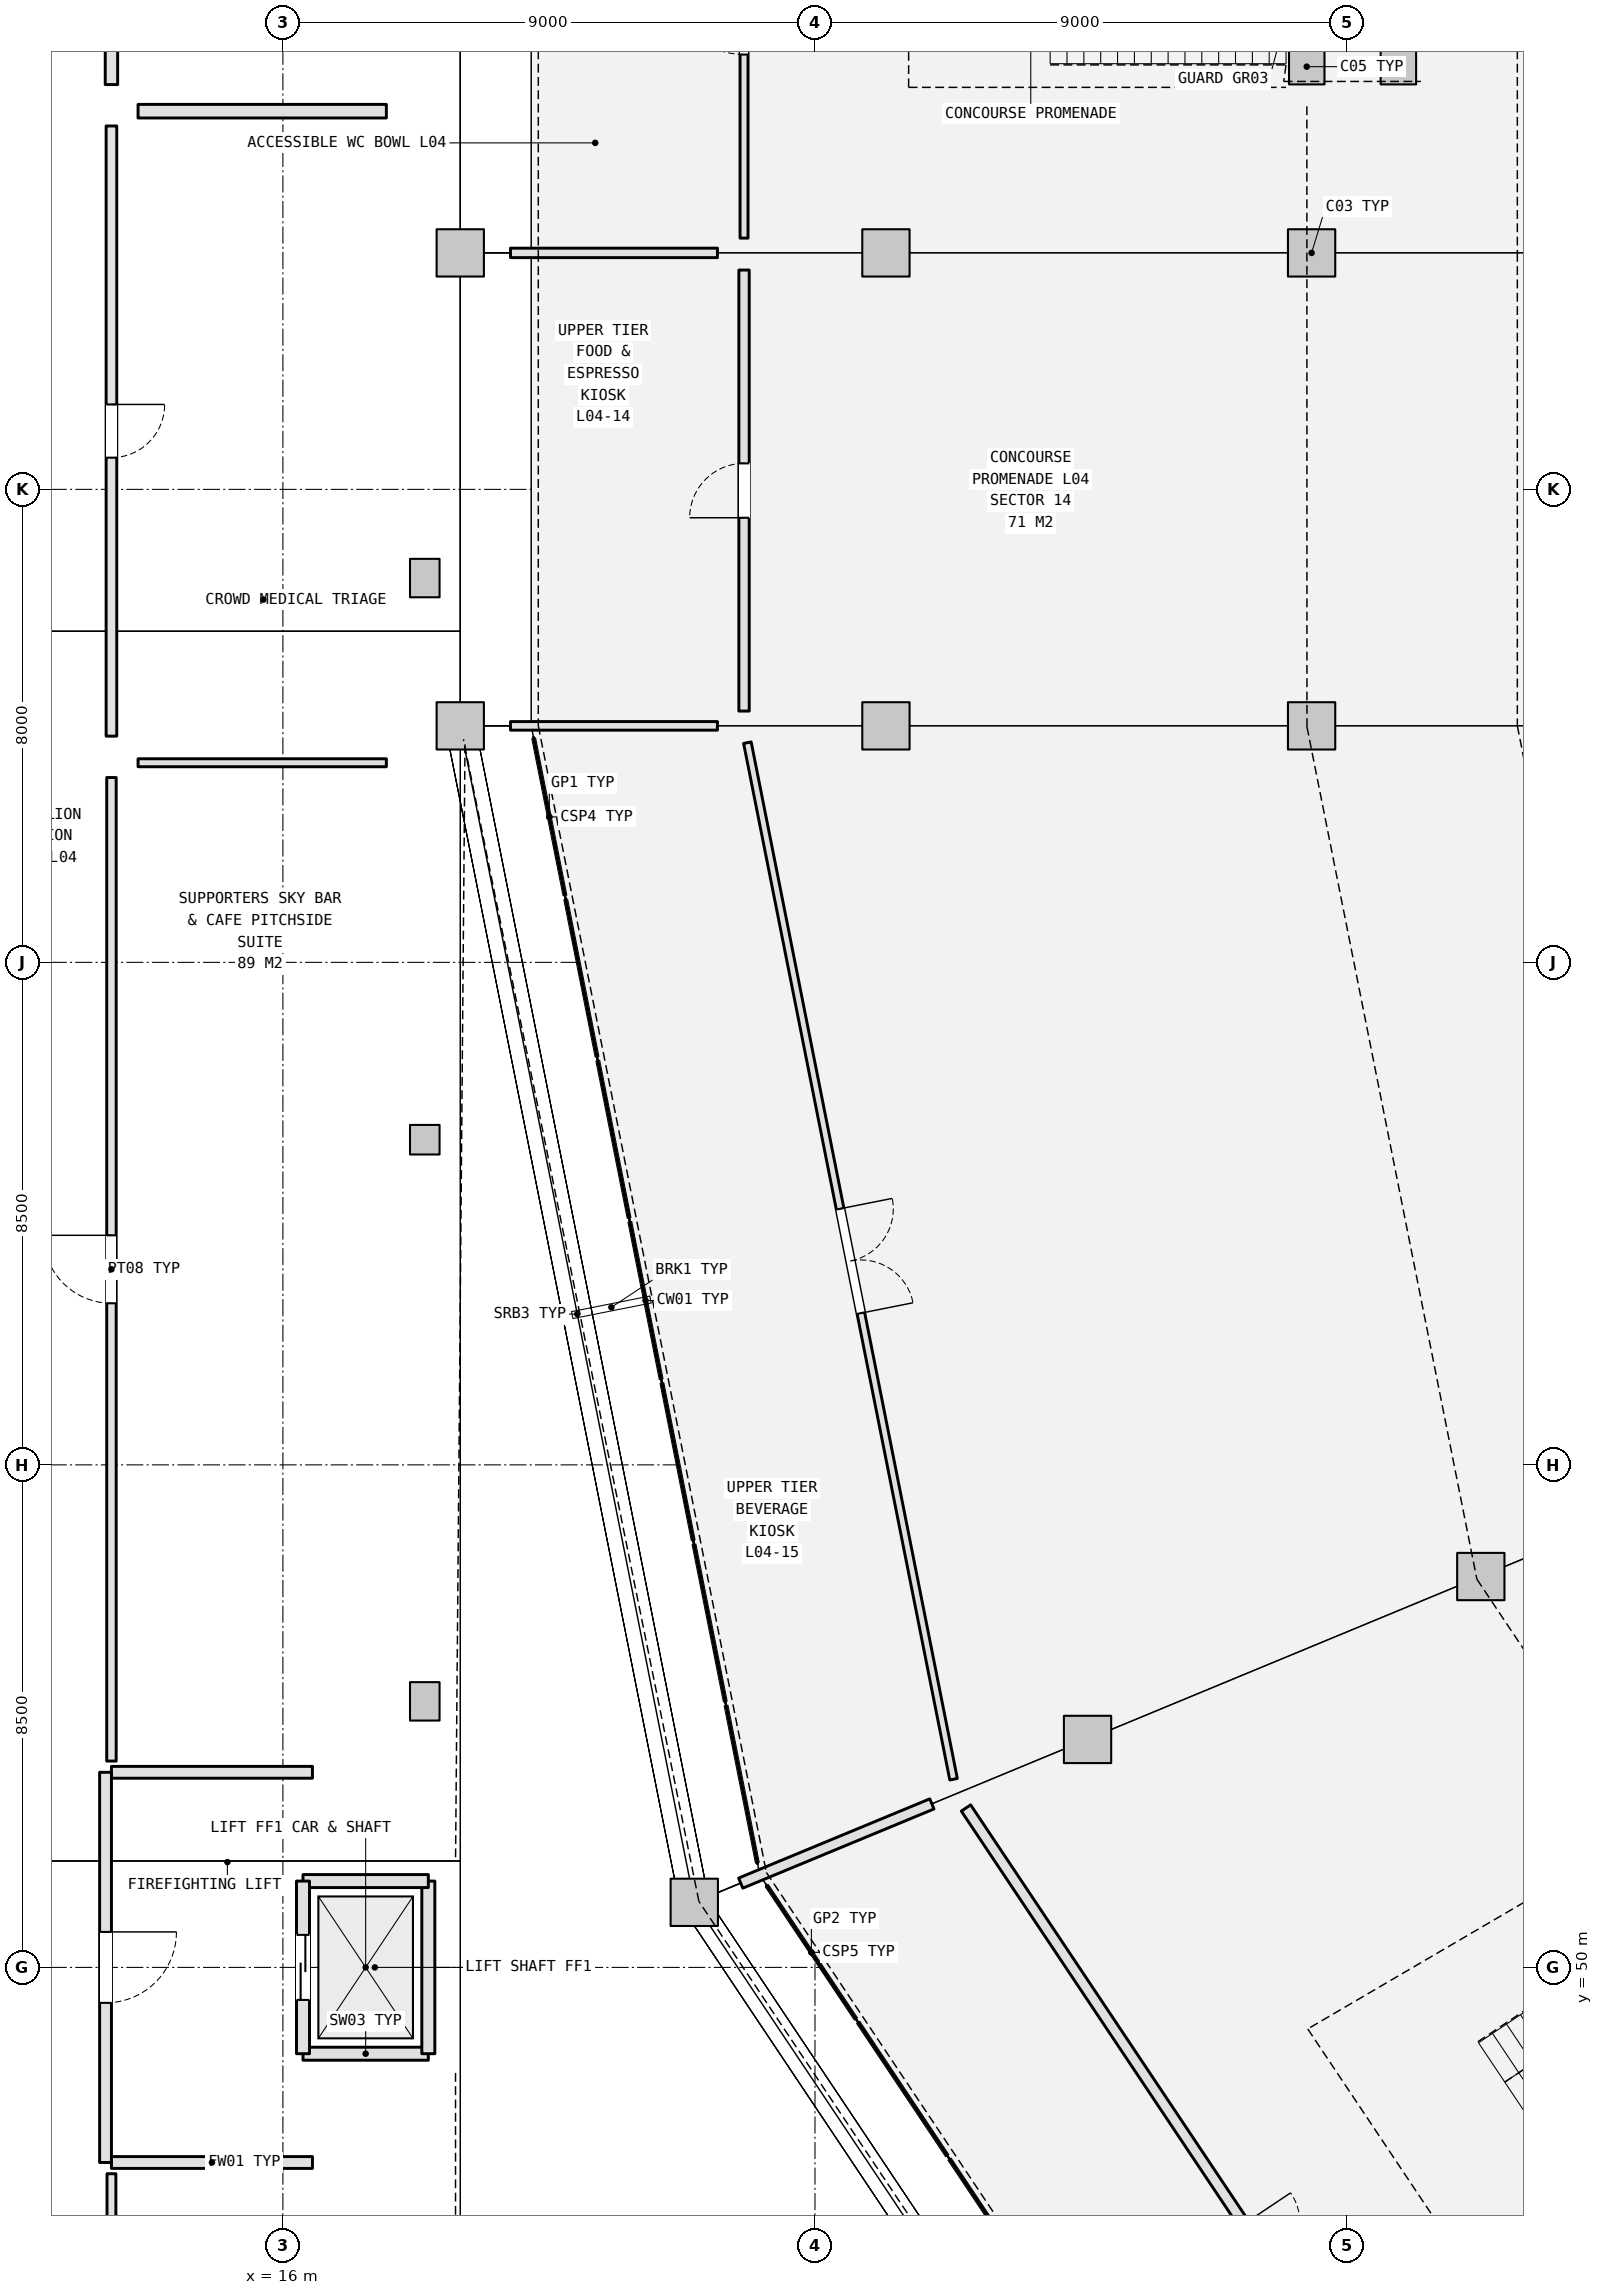
"""IFC4 building model, lengths in metres.
Left out: names, types, materials, properties, quantities, classifications, styles, units other than length and angle.
Written with IfcOpenShell. Run it as: python <this file> out.ifc"""

import sys

from ifc_helpers import new_model, si_unit, direction, frame, frame_2d, origin, origin_2d, place, context, subcontext, project, spatial, rectangle, extrude, element, fill, save


model = new_model("IFC4")
c1 = context("Model", 3, precision=1e-05, world=origin(), true_north=direction((0.0, 1.0)))
c2 = subcontext(c1, "Body", "Model", "MODEL_VIEW")
j1 = project(units=[si_unit("LENGTHUNIT", "METRE"), si_unit("PLANEANGLEUNIT", "RADIAN")], contexts=[c1])
p1 = place(None, origin())
s1 = spatial("IfcSite", under=j1, at=p1, CompositionType="ELEMENT")
p2 = place(p1, origin())
s2 = spatial("IfcBuilding", under=s1, at=p2, CompositionType="ELEMENT")
p3 = place(p2, frame((0.0, 0.0, 21.6)))
s3 = spatial("IfcBuildingStorey", under=s2, at=p3, CompositionType="ELEMENT", Elevation=21.6)
for number, where, z_axis, x_axis in (
    (1, (33.4, 79.0, 0.0), (0.0, 0.0, 1.0), (1.0, 0.0, 0.0)),
    (2, (26.2, 79.0, 0.0), (0.0, 0.0, 1.0), (1.0, 0.0, 0.0)),
    (3, (19.0, 79.0, 0.0), (0.0, 0.0, 1.0), (1.0, 0.0, 0.0)),
    (4, (33.4, 71.0, 0.0), (0.0, 0.0, 1.0), (1.0, 0.0, 0.0)),
    (5, (26.2, 71.0, 0.0), (0.0, 0.0, 1.0), (1.0, 0.0, 0.0)),
    (6, (19.0, 71.0, 0.0), (0.0, 0.0, 1.0), (1.0, 0.0, 0.0)),
    (7, (36.262, 56.611, 0.0), (0.0, 0.0, 1.0), (1.0, 0.0, 0.0)),
    (8, (29.61, 53.856, 0.0), (0.0, 0.0, 1.0), (1.0, 0.0, 0.0)),
    (9, (22.958, 51.1, 0.0), (0.0, 0.0, 1.0), (1.0, 0.0, 0.0)),
):
    element("IfcColumn", number, at=place(p3, frame(where, z_axis=z_axis, x_axis=x_axis)), inside=s3, PredefinedType="COLUMN", context=c2, shape_type="SweptSolid", body=[
        extrude(rectangle(XDim=0.8, YDim=0.8, at=origin_2d()), origin(), (0.0, 0.0, 1.0), 5.4),
    ])
p4 = place(p3, frame((18.4, 54.5, 0.0), z_axis=(0.0, 0.0, 1.0), x_axis=(1.0, 0.0, 0.0)))
e10 = element("IfcColumn", 10, at=p4, inside=s3, PredefinedType="COLUMN", context=c2, shape_type="SweptSolid", body=[
    extrude(rectangle(XDim=0.5, YDim=0.65, at=origin_2d()), origin(), (0.0, 0.0, 1.0), 5.4),
])
p5 = place(p3, frame((18.4, 64.0, 0.0), z_axis=(0.0, 0.0, 1.0), x_axis=(1.0, 0.0, 0.0)))
e11 = element("IfcColumn", 11, at=p5, inside=s3, PredefinedType="COLUMN", context=c2, shape_type="SweptSolid", body=[
    extrude(rectangle(XDim=0.5, YDim=0.5, at=origin_2d()), origin(), (0.0, 0.0, 1.0), 5.4),
])
p6 = place(p3, frame((18.4, 73.5, 0.0), z_axis=(0.0, 0.0, 1.0), x_axis=(1.0, 0.0, 0.0)))
e12 = element("IfcColumn", 12, at=p6, inside=s3, PredefinedType="COLUMN", context=c2, shape_type="SweptSolid", body=[
    extrude(rectangle(XDim=0.5, YDim=0.65, at=origin_2d()), origin(), (0.0, 0.0, 1.0), 5.4),
])
for number, where, z_axis, x_axis in (
    (13, (33.318, 82.15, 0.0), (0.0, 0.0, 1.0), (1.0, 0.0, 0.0)),
    (14, (34.868, 82.15, 0.0), (0.0, 0.0, 1.0), (1.0, 0.0, 0.0)),
):
    element("IfcColumn", number, at=place(p3, frame(where, z_axis=z_axis, x_axis=x_axis)), inside=s3, PredefinedType="COLUMN", context=c2, shape_type="SweptSolid", body=[
        extrude(rectangle(XDim=0.6, YDim=0.6, at=origin_2d()), origin(), (0.0, 0.0, 1.0), 2.494),
    ])
p7 = place(p3, frame((16.34, 48.54, 0.0), z_axis=(0.0, 0.0, 1.0), x_axis=(1.0, 0.0, 0.0)))
e15 = element("IfcWall", 15, at=p7, inside=s3, PredefinedType="SHEAR", context=c2, shape_type="SweptSolid", body=[
    extrude(rectangle(XDim=2.12, YDim=0.22, at=frame_2d((1.06, 0.0))), origin(), (0.0, 0.0, 1.0), 5.15),
])
p8 = place(p3, frame((18.46, 48.54, 0.0), z_axis=(0.0, 0.0, 1.0), x_axis=(0.0, 1.0, 0.0)))
e16 = element("IfcWall", 16, at=p8, inside=s3, PredefinedType="SHEAR", context=c2, shape_type="SweptSolid", body=[
    extrude(rectangle(XDim=2.92, YDim=0.22, at=frame_2d((1.46, 0.0))), origin(), (0.0, 0.0, 1.0), 5.15),
])
p9 = place(p3, frame((18.46, 51.46, 0.0), z_axis=(0.0, 0.0, 1.0), x_axis=(-1.0, 0.0, 0.0)))
e17 = element("IfcWall", 17, at=p9, inside=s3, PredefinedType="SHEAR", context=c2, shape_type="SweptSolid", body=[
    extrude(rectangle(XDim=2.12, YDim=0.22, at=frame_2d((1.06, 0.0))), origin(), (0.0, 0.0, 1.0), 5.15),
])
p10 = place(p3, frame((16.34, 51.46, 0.0), z_axis=(0.0, 0.0, 1.0), x_axis=(0.0, -1.0, 0.0)))
e18 = element("IfcWall", 18, at=p10, inside=s3, PredefinedType="SHEAR", context=c2, shape_type="SweptSolid", body=[
    extrude(rectangle(XDim=2.92, YDim=0.22, at=frame_2d((1.46, 0.0))), origin(), (0.0, 0.0, 1.0), 5.15),
])
p11 = place(p10, frame((0.91, 0.0, 0.0)))
e19 = element("IfcOpeningElement", 19, at=p11, cuts=e18, PredefinedType="OPENING", context=c2, shape_type="SweptSolid", body=[
    extrude(rectangle(XDim=1.1, YDim=2.2, at=frame_2d((0.55, 1.1))), frame((0.0, 0.12, 0.0), z_axis=(0.0, -1.0, 0.0), x_axis=(1.0, 0.0, 0.0)), (0.0, 0.0, 1.0), 0.24),
])
for number, where, z_axis, x_axis in (
    (20, (13.1, 46.7, 0.0), (0.0, 0.0, 1.0), (1.0, 0.0, 0.0)),
    (21, (16.5, 53.3, 0.0), (0.0, 0.0, 1.0), (-1.0, 0.0, 0.0)),
):
    element("IfcWall", number, at=place(p3, frame(where, z_axis=z_axis, x_axis=x_axis)), inside=s3, PredefinedType="SOLIDWALL", context=c2, shape_type="SweptSolid", body=[
        extrude(rectangle(XDim=3.4, YDim=0.2, at=frame_2d((1.7, 0.0))), origin(), (0.0, 0.0, 1.0), 5.12),
    ])
p12 = place(p3, frame((13.0, 53.3, 0.0), z_axis=(0.0, 0.0, 1.0), x_axis=(0.0, -1.0, 0.0)))
e22 = element("IfcWall", 22, at=p12, inside=s3, PredefinedType="SOLIDWALL", context=c2, shape_type="SweptSolid", body=[
    extrude(rectangle(XDim=6.6, YDim=0.2, at=frame_2d((3.3, 0.0))), origin(), (0.0, 0.0, 1.0), 5.12),
])
p13 = place(p12, frame((2.7, 0.0, 0.0)))
e23 = element("IfcOpeningElement", 23, at=p13, cuts=e22, PredefinedType="OPENING", context=c2, shape_type="SweptSolid", body=[
    extrude(rectangle(XDim=1.2, YDim=2.2, at=frame_2d((0.6, 1.1))), frame((0.0, 0.11, 0.0), z_axis=(0.0, -1.0, 0.0), x_axis=(1.0, 0.0, 0.0)), (0.0, 0.0, 1.0), 0.22),
])
p14 = place(p3, frame((13.1, 31.75, 0.0), z_axis=(0.0, 0.0, 1.0), x_axis=(0.0, 1.0, 0.0)))
e24 = element("IfcWall", 24, at=p14, inside=s3, PredefinedType="PARTITIONING", context=c2, shape_type="SweptSolid", body=[
    extrude(rectangle(XDim=14.76, YDim=0.15, at=frame_2d((7.38, 0.0))), origin(), (0.0, 0.0, 1.0), 4.646),
])
p15 = place(p14, frame((6.605, 0.0, 0.0)))
e25 = element("IfcOpeningElement", 25, at=p15, cuts=e24, PredefinedType="OPENING", context=c2, shape_type="SweptSolid", body=[
    extrude(rectangle(XDim=1.55, YDim=2.15, at=frame_2d((0.775, 1.075))), frame((0.0, 0.085, 0.0), z_axis=(0.0, -1.0, 0.0), x_axis=(1.0, 0.0, 0.0)), (0.0, 0.0, 1.0), 0.17),
])
p16 = place(p3, frame((13.1, 53.49, 0.0), z_axis=(0.0, 0.0, 1.0), x_axis=(0.0, 1.0, 0.0)))
e26 = element("IfcWall", 26, at=p16, inside=s3, PredefinedType="PARTITIONING", context=c2, shape_type="SweptSolid", body=[
    extrude(rectangle(XDim=16.636, YDim=0.16, at=frame_2d((8.318, 0.0))), origin(), (0.0, 0.0, 1.0), 4.666),
])
p17 = place(p16, frame((7.743, 0.0, 0.0)))
e27 = element("IfcOpeningElement", 27, at=p17, cuts=e26, PredefinedType="OPENING", context=c2, shape_type="SweptSolid", body=[
    extrude(rectangle(XDim=1.15, YDim=2.2, at=frame_2d((0.575, 1.1))), frame((0.0, 0.09, 0.0), z_axis=(0.0, -1.0, 0.0), x_axis=(1.0, 0.0, 0.0)), (0.0, 0.0, 1.0), 0.18),
])
p18 = place(p3, frame((13.55, 70.376, 0.0), z_axis=(0.0, 0.0, 1.0), x_axis=(1.0, 0.0, 0.0)))
e28 = element("IfcWall", 28, at=p18, inside=s3, PredefinedType="PARTITIONING", context=c2, shape_type="SweptSolid", body=[
    extrude(rectangle(XDim=4.2, YDim=0.135, at=frame_2d((2.1, 0.0))), origin(), (0.0, 0.0, 1.0), 5.12),
])
p19 = place(p3, frame((13.1, 70.826, 0.0), z_axis=(0.0, 0.0, 1.0), x_axis=(0.0, 1.0, 0.0)))
e29 = element("IfcWall", 29, at=p19, inside=s3, PredefinedType="PARTITIONING", context=c2, shape_type="SweptSolid", body=[
    extrude(rectangle(XDim=10.321, YDim=0.18, at=frame_2d((5.161, 0.0))), origin(), (0.0, 0.0, 1.0), 4.666),
])
p20 = place(p19, frame((4.71, 0.0, 0.0)))
e30 = element("IfcOpeningElement", 30, at=p20, cuts=e29, PredefinedType="OPENING", context=c2, shape_type="SweptSolid", body=[
    extrude(rectangle(XDim=0.9, YDim=2.1, at=frame_2d((0.45, 1.05))), frame((0.0, 0.1, 0.0), z_axis=(0.0, -1.0, 0.0), x_axis=(1.0, 0.0, 0.0)), (0.0, 0.0, 1.0), 0.2),
])
p21 = place(p3, frame((13.55, 81.397, 0.0), z_axis=(0.0, 0.0, 1.0), x_axis=(1.0, 0.0, 0.0)))
e31 = element("IfcWall", 31, at=p21, inside=s3, PredefinedType="PLUMBINGWALL", context=c2, shape_type="SweptSolid", body=[
    extrude(rectangle(XDim=4.2, YDim=0.23, at=frame_2d((2.1, 0.0))), origin(), (0.0, 0.0, 1.0), 5.12),
])
p22 = place(p3, frame((13.1, 81.847, 0.0), z_axis=(0.0, 0.0, 1.0), x_axis=(0.0, 1.0, 0.0)))
e32 = element("IfcWall", 32, at=p22, inside=s3, PredefinedType="PLUMBINGWALL", context=c2, shape_type="SweptSolid", body=[
    extrude(rectangle(XDim=9.319, YDim=0.21, at=frame_2d((4.66, 0.0))), origin(), (0.0, 0.0, 1.0), 4.666),
])
p23 = place(p22, frame((4.034, 0.0, 0.0)))
e33 = element("IfcOpeningElement", 33, at=p23, cuts=e32, PredefinedType="OPENING", context=c2, shape_type="SweptSolid", body=[
    extrude(rectangle(XDim=1.25, YDim=2.2, at=frame_2d((0.625, 1.1))), frame((0.0, 0.115, 0.0), z_axis=(0.0, -1.0, 0.0), x_axis=(1.0, 0.0, 0.0)), (0.0, 0.0, 1.0), 0.23),
])
p24 = place(p3, frame((23.8, 86.71, 0.0), z_axis=(0.0, 0.0, 1.0), x_axis=(0.0, -1.0, 0.0)))
e34 = element("IfcWall", 34, at=p24, inside=s3, PredefinedType="PARTITIONING", context=c2, shape_type="SweptSolid", body=[
    extrude(rectangle(XDim=7.46, YDim=0.135, at=frame_2d((3.73, 0.0))), origin(), (0.0, 0.0, 1.0), 2.772),
])
p25 = place(p24, frame((3.105, 0.0, 0.0)))
e35 = element("IfcOpeningElement", 35, at=p25, cuts=e34, PredefinedType="OPENING", context=c2, shape_type="SweptSolid", body=[
    extrude(rectangle(XDim=1.25, YDim=2.2, at=frame_2d((0.625, 1.1))), frame((0.0, 0.077, 0.0), z_axis=(0.0, -1.0, 0.0), x_axis=(1.0, 0.0, 0.0)), (0.0, 0.0, 1.0), 0.155),
])
p26 = place(p3, frame((23.35, 79.0, 0.0), z_axis=(0.0, 0.0, 1.0), x_axis=(-1.0, 0.0, 0.0)))
e36 = element("IfcWall", 36, at=p26, inside=s3, PredefinedType="PARTITIONING", context=c2, shape_type="SweptSolid", body=[
    extrude(rectangle(XDim=3.5, YDim=0.16, at=frame_2d((1.75, 0.0))), origin(), (0.0, 0.0, 1.0), 2.772),
])
p27 = place(p3, frame((23.8, 78.71, 0.0), z_axis=(0.0, 0.0, 1.0), x_axis=(0.0, -1.0, 0.0)))
e37 = element("IfcWall", 37, at=p27, inside=s3, PredefinedType="PARTITIONING", context=c2, shape_type="SweptSolid", body=[
    extrude(rectangle(XDim=7.46, YDim=0.175, at=frame_2d((3.73, 0.0))), origin(), (0.0, 0.0, 1.0), 2.772),
])
p28 = place(p27, frame((3.27, 0.0, 0.0)))
e38 = element("IfcOpeningElement", 38, at=p28, cuts=e37, PredefinedType="OPENING", context=c2, shape_type="SweptSolid", body=[
    extrude(rectangle(XDim=0.92, YDim=2.1, at=frame_2d((0.46, 1.05))), frame((0.0, 0.097, 0.0), z_axis=(0.0, -1.0, 0.0), x_axis=(1.0, 0.0, 0.0)), (0.0, 0.0, 1.0), 0.195),
])
p29 = place(p3, frame((23.35, 71.0, 0.0), z_axis=(0.0, 0.0, 1.0), x_axis=(-1.0, 0.0, 0.0)))
e39 = element("IfcWall", 39, at=p29, inside=s3, PredefinedType="PARTITIONING", context=c2, shape_type="SweptSolid", body=[
    extrude(rectangle(XDim=3.5, YDim=0.145, at=frame_2d((1.75, 0.0))), origin(), (0.0, 0.0, 1.0), 2.772),
])
p30 = place(p3, frame((23.857, 70.716, 0.0), z_axis=(0.0, 0.0, 1.0), x_axis=(0.195078607911, -0.980787610411, 0.0)))
e40 = element("IfcWall", 40, at=p30, inside=s3, PredefinedType="PARTITIONING", context=c2, shape_type="SweptSolid", body=[
    extrude(rectangle(XDim=17.876, YDim=0.13, at=frame_2d((8.938, 0.0))), origin(), (0.0, 0.0, 1.0), 2.772),
])
p31 = place(p30, frame((8.038, 0.0, 0.0)))
e41 = element("IfcOpeningElement", 41, at=p31, cuts=e40, PredefinedType="OPENING", context=c2, shape_type="SweptSolid", body=[
    extrude(rectangle(XDim=1.8, YDim=2.2, at=frame_2d((0.9, 1.1))), frame((0.0, 0.075, 0.0), z_axis=(0.0, -1.0, 0.0), x_axis=(1.0, 0.0, 0.0)), (0.0, 0.0, 1.0), 0.15),
])
p32 = place(p3, frame((26.977, 52.765, 0.0), z_axis=(0.0, 0.0, 1.0), x_axis=(-0.923896124067, -0.382643374349, 0.0)))
e42 = element("IfcWall", 42, at=p32, inside=s3, PredefinedType="PARTITIONING", context=c2, shape_type="SweptSolid", body=[
    extrude(rectangle(XDim=3.5, YDim=0.185, at=frame_2d((1.75, 0.0))), origin(), (0.0, 0.0, 1.0), 2.772),
])
p33 = place(p3, frame((27.554, 52.696, 0.0), z_axis=(0.0, 0.0, 1.0), x_axis=(0.55556974362, -0.831469939309, 0.0)))
e43 = element("IfcWall", 43, at=p33, inside=s3, PredefinedType="PARTITIONING", context=c2, shape_type="SweptSolid", body=[
    extrude(rectangle(XDim=17.876, YDim=0.19, at=frame_2d((8.938, 0.0))), origin(), (0.0, 0.0, 1.0), 2.772),
])
p34 = place(p33, frame((8.463, 0.0, 0.0)))
e44 = element("IfcOpeningElement", 44, at=p34, cuts=e43, PredefinedType="OPENING", context=c2, shape_type="SweptSolid", body=[
    extrude(rectangle(XDim=0.95, YDim=2.15, at=frame_2d((0.475, 1.075))), frame((0.0, 0.105, 0.0), z_axis=(0.0, -1.0, 0.0), x_axis=(1.0, 0.0, 0.0)), (0.0, 0.0, 1.0), 0.21),
])
p35 = place(p11, origin())
e45 = element("IfcDoor", 45, at=p35, inside=s3, OperationType="DOUBLE_DOOR_SLIDING", PredefinedType="DOOR", context=c2, shape_type="SweptSolid", body=[
    extrude(rectangle(XDim=1.1, YDim=2.2, at=frame_2d((0.55, 1.1))), frame((0.0, 0.025, 0.0), z_axis=(0.0, -1.0, 0.0), x_axis=(1.0, 0.0, 0.0)), (0.0, 0.0, 1.0), 0.05),
])
fill(e19, e45)
p36 = place(p13, origin())
e46 = element("IfcDoor", 46, at=p36, inside=s3, OperationType="SINGLE_SWING_LEFT", PredefinedType="DOOR", context=c2, shape_type="SweptSolid", body=[
    extrude(rectangle(XDim=1.2, YDim=2.2, at=frame_2d((0.6, 1.1))), frame((0.0, 0.025, 0.0), z_axis=(0.0, -1.0, 0.0), x_axis=(1.0, 0.0, 0.0)), (0.0, 0.0, 1.0), 0.05),
])
fill(e23, e46)
p37 = place(p17, origin())
e47 = element("IfcDoor", 47, at=p37, inside=s3, OperationType="SINGLE_SWING_RIGHT", PredefinedType="DOOR", context=c2, shape_type="SweptSolid", body=[
    extrude(rectangle(XDim=1.15, YDim=2.2, at=frame_2d((0.575, 1.1))), frame((0.0, 0.025, 0.0), z_axis=(0.0, -1.0, 0.0), x_axis=(1.0, 0.0, 0.0)), (0.0, 0.0, 1.0), 0.05),
])
fill(e27, e47)
p38 = place(p20, frame((0.9, 0.0, 0.0), z_axis=(0.0, 0.0, 1.0), x_axis=(-1.0, 0.0, 0.0)))
e48 = element("IfcDoor", 48, at=p38, inside=s3, OperationType="SINGLE_SWING_RIGHT", PredefinedType="DOOR", context=c2, shape_type="SweptSolid", body=[
    extrude(rectangle(XDim=0.9, YDim=2.1, at=frame_2d((0.45, 1.05))), frame((0.0, 0.025, 0.0), z_axis=(0.0, -1.0, 0.0), x_axis=(1.0, 0.0, 0.0)), (0.0, 0.0, 1.0), 0.05),
])
fill(e30, e48)
p39 = place(p25, frame((1.25, 0.0, 0.0), z_axis=(0.0, 0.0, 1.0), x_axis=(-1.0, 0.0, 0.0)))
e49 = element("IfcDoor", 49, at=p39, inside=s3, OperationType="SINGLE_SWING_LEFT", PredefinedType="DOOR", context=c2, shape_type="SweptSolid", body=[
    extrude(rectangle(XDim=1.25, YDim=2.2, at=frame_2d((0.625, 1.1))), frame((0.0, 0.025, 0.0), z_axis=(0.0, -1.0, 0.0), x_axis=(1.0, 0.0, 0.0)), (0.0, 0.0, 1.0), 0.05),
])
fill(e35, e49)
p40 = place(p28, frame((0.92, 0.0, 0.0), z_axis=(0.0, 0.0, 1.0), x_axis=(-1.0, 0.0, 0.0)))
e50 = element("IfcDoor", 50, at=p40, inside=s3, OperationType="SINGLE_SWING_RIGHT", PredefinedType="DOOR", context=c2, shape_type="SweptSolid", body=[
    extrude(rectangle(XDim=0.92, YDim=2.1, at=frame_2d((0.46, 1.05))), frame((0.0, 0.025, 0.0), z_axis=(0.0, -1.0, 0.0), x_axis=(1.0, 0.0, 0.0)), (0.0, 0.0, 1.0), 0.05),
])
fill(e38, e50)
p41 = place(p31, origin())
e51 = element("IfcDoor", 51, at=p41, inside=s3, OperationType="DOUBLE_DOOR_SINGLE_SWING", PredefinedType="DOOR", context=c2, shape_type="SweptSolid", body=[
    extrude(rectangle(XDim=1.8, YDim=2.2, at=frame_2d((0.9, 1.1))), frame((0.0, 0.025, 0.0), z_axis=(0.0, -1.0, 0.0), x_axis=(1.0, 0.0, 0.0)), (0.0, 0.0, 1.0), 0.05),
])
fill(e41, e51)
save(model, sys.argv[1])
